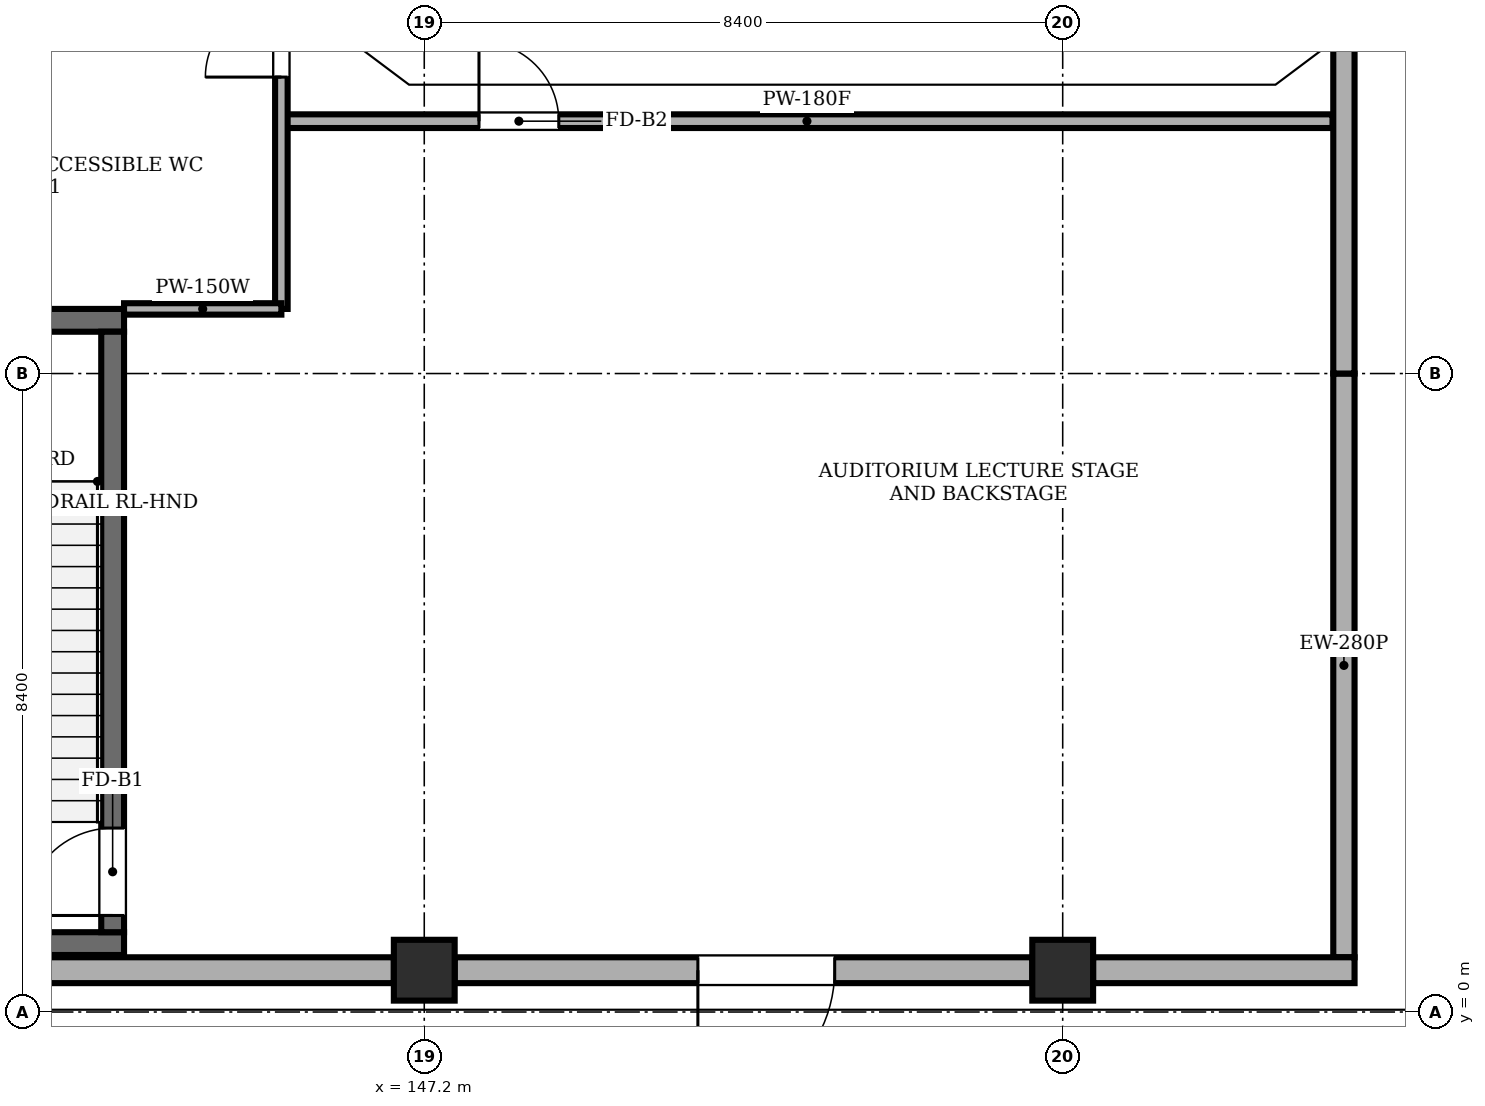
"""IFC4 building model, lengths in metres.
Left out: names, types, materials, properties, quantities, classifications, styles, units other than length and angle.
Written with IfcOpenShell. Run it as: python <this file> out.ifc"""

import sys

from ifc_helpers import new_model, si_unit, direction, frame, frame_2d, origin, origin_2d, place, context, subcontext, project, spatial, rectangle, extrude, element, fill, save


model = new_model("IFC4")
c1 = context("Model", 3, precision=1e-05, world=origin(), true_north=direction((0.0, 1.0)))
c2 = subcontext(c1, "Body", "Model", "MODEL_VIEW")
j1 = project(units=[si_unit("LENGTHUNIT", "METRE"), si_unit("PLANEANGLEUNIT", "RADIAN")], contexts=[c1])
p1 = place(None, origin())
s1 = spatial("IfcSite", under=j1, at=p1, CompositionType="ELEMENT")
p2 = place(p1, origin())
s2 = spatial("IfcBuilding", under=s1, at=p2, CompositionType="ELEMENT")
p3 = place(p2, origin())
s3 = spatial("IfcBuildingStorey", under=s2, at=p3, CompositionType="ELEMENT", Elevation=0.0)
for number, where, z_axis, x_axis in (
    (1, (147.2, 0.55, 0.0), (0.0, 0.0, 1.0), (1.0, 0.0, 0.0)),
    (2, (155.6, 0.55, 0.0), (0.0, 0.0, 1.0), (1.0, 0.0, 0.0)),
):
    element("IfcColumn", number, at=place(p3, frame(where, z_axis=z_axis, x_axis=x_axis)), inside=s3, PredefinedType="COLUMN", context=c2, shape_type="SweptSolid", body=[
        extrude(rectangle(XDim=0.8, YDim=0.8, at=origin_2d()), origin(), (0.0, 0.0, 1.0), 5.18),
    ])
p4 = place(p3, frame((139.2, 0.9, 0.0), z_axis=(0.0, 0.0, 1.0), x_axis=(1.0, 0.0, 0.0)))
e3 = element("IfcWall", 3, at=p4, inside=s3, PredefinedType="SHEAR", context=c2, shape_type="SweptSolid", body=[
    extrude(rectangle(XDim=4.05, YDim=0.3, at=frame_2d((2.025, 0.0))), origin(), (0.0, 0.0, 1.0), 5.18),
])
p5 = place(p3, frame((139.55, 9.1, 0.0), z_axis=(0.0, 0.0, 1.0), x_axis=(1.0, 0.0, 0.0)))
e4 = element("IfcWall", 4, at=p5, inside=s3, PredefinedType="SHEAR", context=c2, shape_type="SweptSolid", body=[
    extrude(rectangle(XDim=3.7, YDim=0.3, at=frame_2d((1.85, 0.0))), origin(), (0.0, 0.0, 1.0), 5.18),
])
p6 = place(p3, frame((143.1, 1.05, 0.0), z_axis=(0.0, 0.0, 1.0), x_axis=(0.0, 1.0, 0.0)))
e5 = element("IfcWall", 5, at=p6, inside=s3, PredefinedType="SHEAR", context=c2, shape_type="SweptSolid", body=[
    extrude(rectangle(XDim=7.9, YDim=0.3, at=frame_2d((3.95, 0.0))), origin(), (0.0, 0.0, 1.0), 5.18),
])
p7 = place(p6, frame((0.22, 0.0, 0.0)))
e6 = element("IfcOpeningElement", 6, at=p7, cuts=e5, PredefinedType="OPENING", context=c2, shape_type="SweptSolid", body=[
    extrude(rectangle(XDim=1.15, YDim=2.15, at=frame_2d((0.575, 1.075))), frame((0.0, 0.16, 0.0), z_axis=(0.0, -1.0, 0.0), x_axis=(1.0, 0.0, 0.0)), (0.0, 0.0, 1.0), 0.32),
])
p8 = place(p3, frame((159.3, 8.4, 0.0), z_axis=(0.0, 0.0, 1.0), x_axis=(0.0, -1.0, 0.0)))
e7 = element("IfcWall", 7, at=p8, inside=s3, PredefinedType="STANDARD", context=c2, shape_type="SweptSolid", body=[
    extrude(rectangle(XDim=7.68, YDim=0.28, at=frame_2d((3.84, 0.0))), origin(), (0.0, 0.0, 1.0), 5.18),
])
p9 = place(p3, frame((159.3, 16.8, 0.0), z_axis=(0.0, 0.0, 1.0), x_axis=(0.0, -1.0, 0.0)))
e8 = element("IfcWall", 8, at=p9, inside=s3, PredefinedType="STANDARD", context=c2, shape_type="SweptSolid", body=[
    extrude(rectangle(XDim=8.4, YDim=0.28, at=frame_2d((4.2, 0.0))), origin(), (0.0, 0.0, 1.0), 5.18),
])
p10 = place(p3, frame((146.8, 0.55, 0.0), z_axis=(0.0, 0.0, 1.0), x_axis=(-1.0, 0.0, 0.0)))
e9 = element("IfcWall", 9, at=p10, inside=s3, PredefinedType="STANDARD", context=c2, shape_type="SweptSolid", body=[
    extrude(rectangle(XDim=7.6, YDim=0.34, at=frame_2d((3.8, 0.0))), origin(), (0.0, 0.0, 1.0), 4.43),
])
p11 = place(p3, frame((155.2, 0.55, 0.0), z_axis=(0.0, 0.0, 1.0), x_axis=(-1.0, 0.0, 0.0)))
e10 = element("IfcWall", 10, at=p11, inside=s3, PredefinedType="STANDARD", context=c2, shape_type="SweptSolid", body=[
    extrude(rectangle(XDim=7.6, YDim=0.34, at=frame_2d((3.8, 0.0))), origin(), (0.0, 0.0, 1.0), 4.43),
])
p12 = place(p11, frame((2.6, 0.0, 0.0)))
e11 = element("IfcOpeningElement", 11, at=p12, cuts=e10, PredefinedType="OPENING", context=c2, shape_type="SweptSolid", body=[
    extrude(rectangle(XDim=1.8, YDim=2.3, at=frame_2d((0.9, 1.15))), frame((0.0, 0.18, 0.0), z_axis=(0.0, -1.0, 0.0), x_axis=(1.0, 0.0, 0.0)), (0.0, 0.0, 1.0), 0.36),
])
p13 = place(p3, frame((159.44, 0.55, 0.0), z_axis=(0.0, 0.0, 1.0), x_axis=(-1.0, 0.0, 0.0)))
e12 = element("IfcWall", 12, at=p13, inside=s3, PredefinedType="STANDARD", context=c2, shape_type="SweptSolid", body=[
    extrude(rectangle(XDim=3.44, YDim=0.34, at=frame_2d((1.72, 0.0))), origin(), (0.0, 0.0, 1.0), 4.43),
])
p14 = place(p3, frame((145.32, 11.72, 0.0), z_axis=(0.0, 0.0, 1.0), x_axis=(1.0, 0.0, 0.0)))
e13 = element("IfcWall", 13, at=p14, inside=s3, PredefinedType="STANDARD", context=c2, shape_type="SweptSolid", body=[
    extrude(rectangle(XDim=13.83, YDim=0.18, at=frame_2d((6.915, 0.0))), origin(), (0.0, 0.0, 1.0), 5.18),
])
p15 = place(p14, frame((2.6, 0.0, 0.0)))
e14 = element("IfcOpeningElement", 14, at=p15, cuts=e13, PredefinedType="OPENING", context=c2, shape_type="SweptSolid", body=[
    extrude(rectangle(XDim=1.05, YDim=2.15, at=frame_2d((0.525, 1.075))), frame((0.0, 0.1, 0.0), z_axis=(0.0, -1.0, 0.0), x_axis=(1.0, 0.0, 0.0)), (0.0, 0.0, 1.0), 0.2),
])
p16 = place(p3, frame((145.32, 9.25, 0.0), z_axis=(0.0, 0.0, 1.0), x_axis=(0.0, 1.0, 0.0)))
e15 = element("IfcWall", 15, at=p16, inside=s3, PredefinedType="PARTITIONING", context=c2, shape_type="SweptSolid", body=[
    extrude(rectangle(XDim=20.87, YDim=0.165, at=frame_2d((10.435, 0.0))), origin(), (0.0, 0.0, 1.0), 5.18),
])
p17 = place(p16, frame((3.05, 0.0, 0.0)))
e16 = element("IfcOpeningElement", 16, at=p17, cuts=e15, PredefinedType="OPENING", context=c2, shape_type="SweptSolid", body=[
    extrude(rectangle(XDim=1.0, YDim=2.12, at=frame_2d((0.5, 1.06))), frame((0.0, 0.093, 0.0), z_axis=(0.0, -1.0, 0.0), x_axis=(1.0, 0.0, 0.0)), (0.0, 0.0, 1.0), 0.185),
])
p18 = place(p16, frame((8.1, 0.0, 0.0)))
e17 = element("IfcOpeningElement", 17, at=p18, cuts=e15, PredefinedType="OPENING", context=c2, shape_type="SweptSolid", body=[
    extrude(rectangle(XDim=0.92, YDim=2.1, at=frame_2d((0.46, 1.05))), frame((0.0, 0.093, 0.0), z_axis=(0.0, -1.0, 0.0), x_axis=(1.0, 0.0, 0.0)), (0.0, 0.0, 1.0), 0.185),
])
p19 = place(p16, frame((17.5, 0.0, 0.0)))
e18 = element("IfcOpeningElement", 18, at=p19, cuts=e15, PredefinedType="OPENING", context=c2, shape_type="SweptSolid", body=[
    extrude(rectangle(XDim=1.02, YDim=2.15, at=frame_2d((0.51, 1.075))), frame((0.0, 0.093, 0.0), z_axis=(0.0, -1.0, 0.0), x_axis=(1.0, 0.0, 0.0)), (0.0, 0.0, 1.0), 0.185),
])
p20 = place(p3, frame((143.25, 9.25, 0.0), z_axis=(0.0, 0.0, 1.0), x_axis=(1.0, 0.0, 0.0)))
e19 = element("IfcWall", 19, at=p20, inside=s3, PredefinedType="PARTITIONING", context=c2, shape_type="SweptSolid", body=[
    extrude(rectangle(XDim=2.07, YDim=0.15, at=frame_2d((1.035, 0.0))), origin(), (0.0, 0.0, 1.0), 5.18),
])
p21 = place(p12, origin())
e20 = element("IfcDoor", 20, at=p21, inside=s3, OperationType="SINGLE_SWING_RIGHT", PredefinedType="DOOR", context=c2, shape_type="SweptSolid", body=[
    extrude(rectangle(XDim=1.8, YDim=2.3, at=frame_2d((0.9, 1.15))), frame((0.0, 0.025, 0.0), z_axis=(0.0, -1.0, 0.0), x_axis=(1.0, 0.0, 0.0)), (0.0, 0.0, 1.0), 0.05),
])
fill(e11, e20)
p22 = place(p15, origin())
e21 = element("IfcDoor", 21, at=p22, inside=s3, OperationType="SINGLE_SWING_LEFT", PredefinedType="DOOR", context=c2, shape_type="SweptSolid", body=[
    extrude(rectangle(XDim=1.05, YDim=2.15, at=frame_2d((0.525, 1.075))), frame((0.0, 0.025, 0.0), z_axis=(0.0, -1.0, 0.0), x_axis=(1.0, 0.0, 0.0)), (0.0, 0.0, 1.0), 0.05),
])
fill(e14, e21)
p23 = place(p17, origin())
e22 = element("IfcDoor", 22, at=p23, inside=s3, OperationType="SINGLE_SWING_LEFT", PredefinedType="DOOR", context=c2, shape_type="SweptSolid", body=[
    extrude(rectangle(XDim=1.0, YDim=2.12, at=frame_2d((0.5, 1.06))), frame((0.0, 0.025, 0.0), z_axis=(0.0, -1.0, 0.0), x_axis=(1.0, 0.0, 0.0)), (0.0, 0.0, 1.0), 0.05),
])
fill(e16, e22)
p24 = place(p7, origin())
e23 = element("IfcDoor", 23, at=p24, inside=s3, OperationType="SINGLE_SWING_LEFT", PredefinedType="DOOR", context=c2, shape_type="SweptSolid", body=[
    extrude(rectangle(XDim=1.15, YDim=2.15, at=frame_2d((0.575, 1.075))), frame((0.0, 0.025, 0.0), z_axis=(0.0, -1.0, 0.0), x_axis=(1.0, 0.0, 0.0)), (0.0, 0.0, 1.0), 0.05),
])
fill(e6, e23)
save(model, sys.argv[1])
